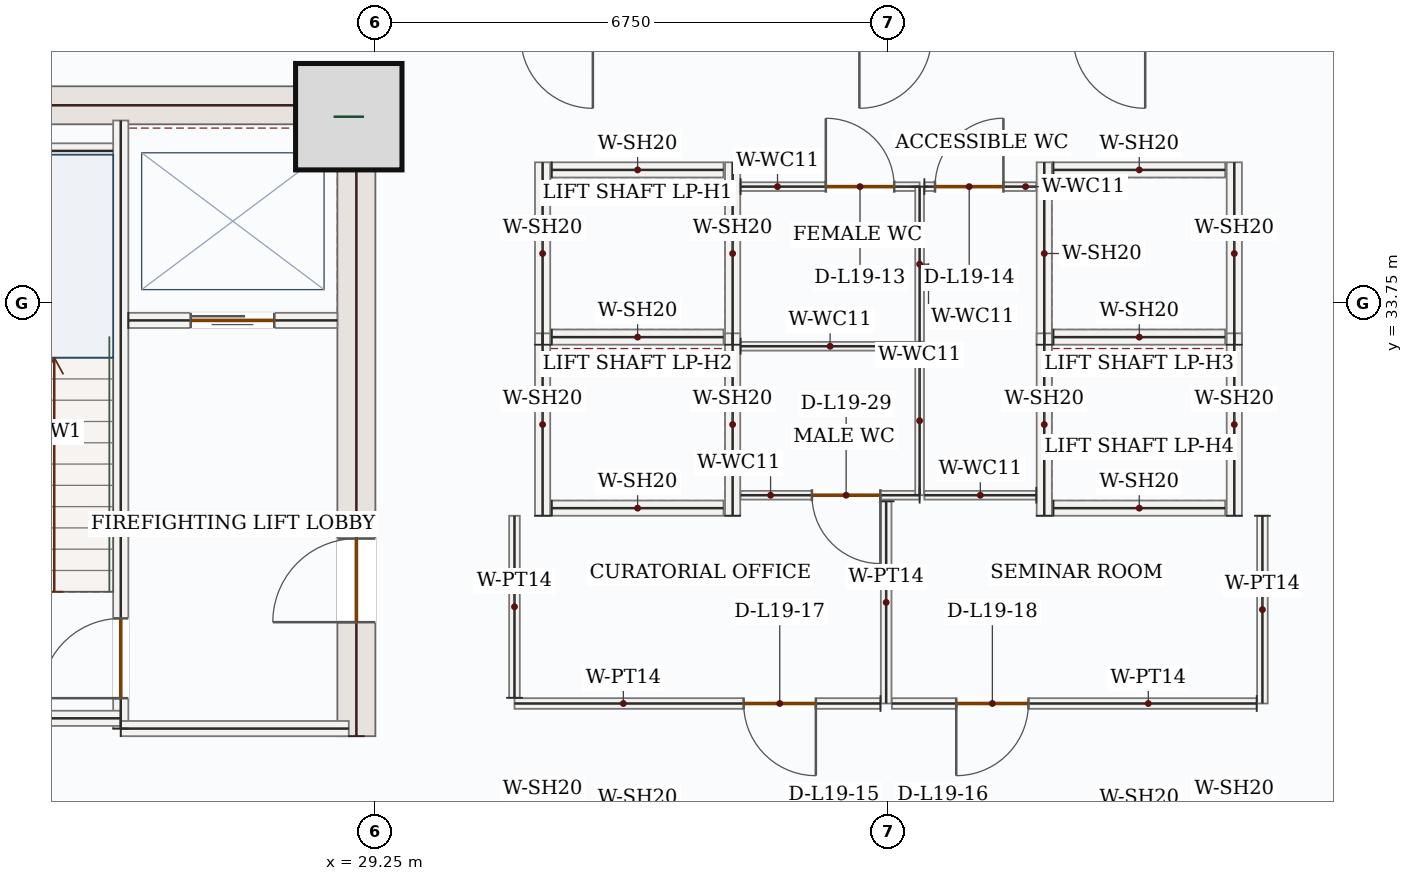
"""IFC4 building model, lengths in metres.
Left out: names, types, materials, properties, quantities, classifications, styles, units other than length and angle.
Written with IfcOpenShell. Run it as: python <this file> out.ifc"""

import sys

from ifc_helpers import new_model, si_unit, direction, frame, frame_2d, origin, origin_2d, place, context, subcontext, project, spatial, rectangle, extrude, source, transform, mapped, element, fill, save


model = new_model("IFC4")
c1 = context("Model", 3, precision=1e-05, world=origin(), true_north=direction((0.0, 1.0)))
c2 = subcontext(c1, "Body", "Model", "MODEL_VIEW")
j1 = project(units=[si_unit("LENGTHUNIT", "METRE"), si_unit("PLANEANGLEUNIT", "RADIAN")], contexts=[c1])
p1 = place(None, origin())
s1 = spatial("IfcSite", under=j1, at=p1, CompositionType="ELEMENT")
p2 = place(p1, origin())
s2 = spatial("IfcBuilding", under=s1, at=p2, CompositionType="ELEMENT")
p3 = place(p2, frame((0.0, 0.0, 87.9)))
s3 = spatial("IfcBuildingStorey", under=s2, at=p3, CompositionType="ELEMENT", Elevation=87.9)
p4 = place(p3, frame((29.0, 28.05, 0.0), z_axis=(0.0, 0.0, 1.0), x_axis=(0.0, 1.0, 0.0)))
e1 = element("IfcWall", 1, at=p4, inside=s3, PredefinedType="SHEAR", context=c2, shape_type="SweptSolid", body=[
    extrude(rectangle(XDim=8.55, YDim=0.5, at=frame_2d((4.275, 0.0))), origin(), (0.0, 0.0, 1.0), 3.95),
])
p5 = place(p4, frame((1.5, 0.0, 0.0)))
e2 = element("IfcOpeningElement", 2, at=p5, cuts=e1, PredefinedType="OPENING", context=c2, shape_type="SweptSolid", body=[
    extrude(rectangle(XDim=1.1, YDim=2.2, at=frame_2d((0.55, 1.1))), frame((0.0, 0.26, 0.0), z_axis=(0.0, -1.0, 0.0), x_axis=(1.0, 0.0, 0.0)), (0.0, 0.0, 1.0), 0.52),
])
m1 = source(origin(), c2, "Body", "SweptSolid", [
    extrude(rectangle(XDim=7.0, YDim=0.5, at=frame_2d((3.5, 0.0))), origin(), (0.0, 0.0, 1.0), 3.95),
])
p6 = place(p3, frame((21.75, 36.35, 0.0), z_axis=(0.0, 0.0, 1.0), x_axis=(1.0, 0.0, 0.0)))
e3 = element("IfcWall", 3, at=p6, inside=s3, PredefinedType="SHEAR", context=c2, shape_type="MappedRepresentation", body=[
    mapped(m1, transform((0.0, 0.0, 0.0), x_axis=(1.0, 0.0, 0.0), y_axis=(0.0, 1.0, 0.0), z_axis=(0.0, 0.0, 1.0), scale=1.0)),
])
m2 = source(origin(), c2, "Body", "SweptSolid", [
    extrude(rectangle(XDim=1.4, YDim=1.4, at=origin_2d()), origin(), (0.0, 0.0, 1.0), 4.2),
])
p7 = place(p3, frame((28.9, 36.2, 0.0), z_axis=(0.0, 0.0, 1.0), x_axis=(1.0, 0.0, 0.0)))
e4 = element("IfcColumn", 4, at=p7, inside=s3, PredefinedType="COLUMN", context=c2, shape_type="MappedRepresentation", body=[
    mapped(m2, transform((0.0, 0.0, 0.0), x_axis=(1.0, 0.0, 0.0), y_axis=(0.0, 1.0, 0.0), z_axis=(0.0, 0.0, 1.0), scale=1.0)),
])
p8 = place(p3, frame((25.9, 28.15, 0.0), z_axis=(0.0, 0.0, 1.0), x_axis=(0.0, 1.0, 0.0)))
e5 = element("IfcWall", 5, at=p8, inside=s3, PredefinedType="SOLIDWALL", context=c2, shape_type="SweptSolid", body=[
    extrude(rectangle(XDim=8.0, YDim=0.2, at=frame_2d((4.0, 0.0))), origin(), (0.0, 0.0, 1.0), 3.95),
])
p9 = place(p8, frame((0.4, 0.0, 0.0)))
e6 = element("IfcOpeningElement", 6, at=p9, cuts=e5, PredefinedType="OPENING", context=c2, shape_type="SweptSolid", body=[
    extrude(rectangle(XDim=1.05, YDim=2.15, at=frame_2d((0.525, 1.075))), frame((0.0, 0.11, 0.0), z_axis=(0.0, -1.0, 0.0), x_axis=(1.0, 0.0, 0.0)), (0.0, 0.0, 1.0), 0.22),
])
m3 = source(origin(), c2, "Body", "SweptSolid", [
    extrude(rectangle(XDim=4.25, YDim=0.2, at=frame_2d((2.125, 0.0))), origin(), (0.0, 0.0, 1.0), 3.95),
])
p10 = place(p3, frame((21.65, 28.285, 0.0), z_axis=(0.0, 0.0, 1.0), x_axis=(1.0, 0.0, 0.0)))
e7 = element("IfcWall", 7, at=p10, inside=s3, PredefinedType="SOLIDWALL", context=c2, shape_type="MappedRepresentation", body=[
    mapped(m3, transform((0.0, 0.0, 0.0), x_axis=(1.0, 0.0, 0.0), y_axis=(0.0, 1.0, 0.0), z_axis=(0.0, 0.0, 1.0), scale=1.0)),
])
m4 = source(origin(), c2, "Body", "SweptSolid", [
    extrude(rectangle(XDim=3.0, YDim=0.2, at=frame_2d((1.5, 0.0))), origin(), (0.0, 0.0, 1.0), 3.95),
])
p11 = place(p3, frame((25.9, 28.15, 0.0), z_axis=(0.0, 0.0, 1.0), x_axis=(1.0, 0.0, 0.0)))
e8 = element("IfcWall", 8, at=p11, inside=s3, PredefinedType="SOLIDWALL", context=c2, shape_type="MappedRepresentation", body=[
    mapped(m4, transform((0.0, 0.0, 0.0), x_axis=(1.0, 0.0, 0.0), y_axis=(0.0, 1.0, 0.0), z_axis=(0.0, 0.0, 1.0), scale=1.0)),
])
m5 = source(origin(), c2, "Body", "SweptSolid", [
    extrude(rectangle(XDim=3.25, YDim=0.2, at=frame_2d((1.625, 0.0))), origin(), (0.0, 0.0, 1.0), 3.95),
])
p12 = place(p3, frame((22.55, 35.75, 0.0), z_axis=(0.0, 0.0, 1.0), x_axis=(1.0, 0.0, 0.0)))
e9 = element("IfcWall", 9, at=p12, inside=s3, PredefinedType="SOLIDWALL", context=c2, shape_type="MappedRepresentation", body=[
    mapped(m5, transform((0.0, 0.0, 0.0), x_axis=(1.0, 0.0, 0.0), y_axis=(0.0, 1.0, 0.0), z_axis=(0.0, 0.0, 1.0), scale=1.0)),
])
p13 = place(p3, frame((26.0, 33.52, 0.0), z_axis=(0.0, 0.0, 1.0), x_axis=(1.0, 0.0, 0.0)))
e10 = element("IfcWall", 10, at=p13, inside=s3, PredefinedType="SOLIDWALL", context=c2, shape_type="SweptSolid", body=[
    extrude(rectangle(XDim=2.75, YDim=0.2, at=frame_2d((1.375, 0.0))), origin(), (0.0, 0.0, 1.0), 3.95),
])
p14 = place(p13, frame((0.82, 0.0, 0.0)))
e11 = element("IfcOpeningElement", 11, at=p14, cuts=e10, PredefinedType="OPENING", context=c2, shape_type="SweptSolid", body=[
    extrude(rectangle(XDim=1.1, YDim=2.15, at=frame_2d((0.55, 1.075))), frame((0.0, 0.11, 0.0), z_axis=(0.0, -1.0, 0.0), x_axis=(1.0, 0.0, 0.0)), (0.0, 0.0, 1.0), 0.22),
])
m6 = source(origin(), c2, "Body", "SweptSolid", [
    extrude(rectangle(XDim=2.4, YDim=0.2, at=frame_2d((1.2, 0.0))), origin(), (0.0, 0.0, 1.0), 3.95),
])
for number, where, z_axis, x_axis in (
    (12, (31.45, 33.2, 0.0), (0.0, 0.0, 1.0), (0.0, 1.0, 0.0)),
    (13, (33.95, 33.2, 0.0), (0.0, 0.0, 1.0), (0.0, 1.0, 0.0)),
):
    element("IfcWall", number, at=place(p3, frame(where, z_axis=z_axis, x_axis=x_axis)), inside=s3, PredefinedType="SOLIDWALL", context=c2, shape_type="MappedRepresentation", body=[
        mapped(m6, transform((0.0, 0.0, 0.0), x_axis=(1.0, 0.0, 0.0), y_axis=(0.0, 1.0, 0.0), z_axis=(0.0, 0.0, 1.0), scale=1.0)),
    ])
m7 = source(origin(), c2, "Body", "SweptSolid", [
    extrude(rectangle(XDim=2.26, YDim=0.2, at=frame_2d((1.13, 0.0))), origin(), (0.0, 0.0, 1.0), 3.95),
])
for number, where, z_axis, x_axis in (
    (14, (31.57, 33.3, 0.0), (0.0, 0.0, 1.0), (1.0, 0.0, 0.0)),
    (15, (31.57, 35.5, 0.0), (0.0, 0.0, 1.0), (1.0, 0.0, 0.0)),
):
    element("IfcWall", number, at=place(p3, frame(where, z_axis=z_axis, x_axis=x_axis)), inside=s3, PredefinedType="SOLIDWALL", context=c2, shape_type="MappedRepresentation", body=[
        mapped(m7, transform((0.0, 0.0, 0.0), x_axis=(1.0, 0.0, 0.0), y_axis=(0.0, 1.0, 0.0), z_axis=(0.0, 0.0, 1.0), scale=1.0)),
    ])
for number, where, z_axis, x_axis in (
    (16, (31.45, 30.95, 0.0), (0.0, 0.0, 1.0), (0.0, 1.0, 0.0)),
    (17, (33.95, 30.95, 0.0), (0.0, 0.0, 1.0), (0.0, 1.0, 0.0)),
):
    element("IfcWall", number, at=place(p3, frame(where, z_axis=z_axis, x_axis=x_axis)), inside=s3, PredefinedType="SOLIDWALL", context=c2, shape_type="MappedRepresentation", body=[
        mapped(m6, transform((0.0, 0.0, 0.0), x_axis=(1.0, 0.0, 0.0), y_axis=(0.0, 1.0, 0.0), z_axis=(0.0, 0.0, 1.0), scale=1.0)),
    ])
p15 = place(p3, frame((31.57, 31.05, 0.0), z_axis=(0.0, 0.0, 1.0), x_axis=(1.0, 0.0, 0.0)))
e18 = element("IfcWall", 18, at=p15, inside=s3, PredefinedType="SOLIDWALL", context=c2, shape_type="MappedRepresentation", body=[
    mapped(m7, transform((0.0, 0.0, 0.0), x_axis=(1.0, 0.0, 0.0), y_axis=(0.0, 1.0, 0.0), z_axis=(0.0, 0.0, 1.0), scale=1.0)),
])
for number, where, z_axis, x_axis in (
    (19, (38.05, 33.2, 0.0), (0.0, 0.0, 1.0), (0.0, 1.0, 0.0)),
    (20, (40.55, 33.2, 0.0), (0.0, 0.0, 1.0), (0.0, 1.0, 0.0)),
):
    element("IfcWall", number, at=place(p3, frame(where, z_axis=z_axis, x_axis=x_axis)), inside=s3, PredefinedType="SOLIDWALL", context=c2, shape_type="MappedRepresentation", body=[
        mapped(m6, transform((0.0, 0.0, 0.0), x_axis=(1.0, 0.0, 0.0), y_axis=(0.0, 1.0, 0.0), z_axis=(0.0, 0.0, 1.0), scale=1.0)),
    ])
for number, where, z_axis, x_axis in (
    (21, (38.17, 33.3, 0.0), (0.0, 0.0, 1.0), (1.0, 0.0, 0.0)),
    (22, (38.17, 35.5, 0.0), (0.0, 0.0, 1.0), (1.0, 0.0, 0.0)),
):
    element("IfcWall", number, at=place(p3, frame(where, z_axis=z_axis, x_axis=x_axis)), inside=s3, PredefinedType="SOLIDWALL", context=c2, shape_type="MappedRepresentation", body=[
        mapped(m7, transform((0.0, 0.0, 0.0), x_axis=(1.0, 0.0, 0.0), y_axis=(0.0, 1.0, 0.0), z_axis=(0.0, 0.0, 1.0), scale=1.0)),
    ])
for number, where, z_axis, x_axis in (
    (23, (38.05, 30.95, 0.0), (0.0, 0.0, 1.0), (0.0, 1.0, 0.0)),
    (24, (40.55, 30.95, 0.0), (0.0, 0.0, 1.0), (0.0, 1.0, 0.0)),
):
    element("IfcWall", number, at=place(p3, frame(where, z_axis=z_axis, x_axis=x_axis)), inside=s3, PredefinedType="SOLIDWALL", context=c2, shape_type="MappedRepresentation", body=[
        mapped(m6, transform((0.0, 0.0, 0.0), x_axis=(1.0, 0.0, 0.0), y_axis=(0.0, 1.0, 0.0), z_axis=(0.0, 0.0, 1.0), scale=1.0)),
    ])
p16 = place(p3, frame((38.17, 31.05, 0.0), z_axis=(0.0, 0.0, 1.0), x_axis=(1.0, 0.0, 0.0)))
e25 = element("IfcWall", 25, at=p16, inside=s3, PredefinedType="SOLIDWALL", context=c2, shape_type="MappedRepresentation", body=[
    mapped(m7, transform((0.0, 0.0, 0.0), x_axis=(1.0, 0.0, 0.0), y_axis=(0.0, 1.0, 0.0), z_axis=(0.0, 0.0, 1.0), scale=1.0)),
])
p17 = place(p3, frame((36.41, 31.22, 0.0), z_axis=(0.0, 0.0, 1.0), x_axis=(-1.0, 0.0, 0.0)))
e26 = element("IfcWall", 26, at=p17, inside=s3, PredefinedType="PARTITIONING", context=c2, shape_type="SweptSolid", body=[
    extrude(rectangle(XDim=2.355, YDim=0.115, at=frame_2d((1.177, 0.0))), origin(), (0.0, 0.0, 1.0), 3.95),
])
p18 = place(p17, frame((0.517, 0.0, 0.0)))
e27 = element("IfcOpeningElement", 27, at=p18, cuts=e26, PredefinedType="OPENING", context=c2, shape_type="SweptSolid", body=[
    extrude(rectangle(XDim=0.9, YDim=2.1, at=frame_2d((0.45, 1.05))), frame((0.0, 0.067, 0.0), z_axis=(0.0, -1.0, 0.0), x_axis=(1.0, 0.0, 0.0)), (0.0, 0.0, 1.0), 0.135),
])
m8 = source(origin(), c2, "Body", "SweptSolid", [
    extrude(rectangle(XDim=2.355, YDim=0.115, at=frame_2d((1.177, 0.0))), origin(), (0.0, 0.0, 1.0), 3.95),
])
p19 = place(p3, frame((34.055, 33.18, 0.0), z_axis=(0.0, 0.0, 1.0), x_axis=(1.0, 0.0, 0.0)))
e28 = element("IfcWall", 28, at=p19, inside=s3, PredefinedType="PARTITIONING", context=c2, shape_type="MappedRepresentation", body=[
    mapped(m8, transform((0.0, 0.0, 0.0), x_axis=(1.0, 0.0, 0.0), y_axis=(0.0, 1.0, 0.0), z_axis=(0.0, 0.0, 1.0), scale=1.0)),
])
m9 = source(origin(), c2, "Body", "SweptSolid", [
    extrude(rectangle(XDim=1.96, YDim=0.115, at=frame_2d((0.98, 0.0))), origin(), (0.0, 0.0, 1.0), 3.95),
])
p20 = place(p3, frame((36.41, 33.18, 0.0), z_axis=(0.0, 0.0, 1.0), x_axis=(0.0, -1.0, 0.0)))
e29 = element("IfcWall", 29, at=p20, inside=s3, PredefinedType="PARTITIONING", context=c2, shape_type="MappedRepresentation", body=[
    mapped(m9, transform((0.0, 0.0, 0.0), x_axis=(1.0, 0.0, 0.0), y_axis=(0.0, 1.0, 0.0), z_axis=(0.0, 0.0, 1.0), scale=1.0)),
])
p21 = place(p3, frame((34.055, 35.28, 0.0), z_axis=(0.0, 0.0, 1.0), x_axis=(1.0, 0.0, 0.0)))
e30 = element("IfcWall", 30, at=p21, inside=s3, PredefinedType="PARTITIONING", context=c2, shape_type="SweptSolid", body=[
    extrude(rectangle(XDim=2.355, YDim=0.115, at=frame_2d((1.177, 0.0))), origin(), (0.0, 0.0, 1.0), 3.95),
])
p22 = place(p21, frame((1.121, 0.0, 0.0)))
e31 = element("IfcOpeningElement", 31, at=p22, cuts=e30, PredefinedType="OPENING", context=c2, shape_type="SweptSolid", body=[
    extrude(rectangle(XDim=0.9, YDim=2.1, at=frame_2d((0.45, 1.05))), frame((0.0, 0.067, 0.0), z_axis=(0.0, -1.0, 0.0), x_axis=(1.0, 0.0, 0.0)), (0.0, 0.0, 1.0), 0.135),
])
m10 = source(origin(), c2, "Body", "SweptSolid", [
    extrude(rectangle(XDim=2.04, YDim=0.115, at=frame_2d((1.02, 0.0))), origin(), (0.0, 0.0, 1.0), 3.95),
])
p23 = place(p3, frame((36.41, 35.28, 0.0), z_axis=(0.0, 0.0, 1.0), x_axis=(0.0, -1.0, 0.0)))
e32 = element("IfcWall", 32, at=p23, inside=s3, PredefinedType="PARTITIONING", context=c2, shape_type="MappedRepresentation", body=[
    mapped(m10, transform((0.0, 0.0, 0.0), x_axis=(1.0, 0.0, 0.0), y_axis=(0.0, 1.0, 0.0), z_axis=(0.0, 0.0, 1.0), scale=1.0)),
])
m11 = source(origin(), c2, "Body", "SweptSolid", [
    extrude(rectangle(XDim=1.473, YDim=0.115, at=frame_2d((0.736, 0.0))), origin(), (0.0, 0.0, 1.0), 3.95),
])
p24 = place(p3, frame((37.945, 31.22, 0.0), z_axis=(0.0, 0.0, 1.0), x_axis=(-1.0, 0.0, 0.0)))
e33 = element("IfcWall", 33, at=p24, inside=s3, PredefinedType="PARTITIONING", context=c2, shape_type="MappedRepresentation", body=[
    mapped(m11, transform((0.0, 0.0, 0.0), x_axis=(1.0, 0.0, 0.0), y_axis=(0.0, 1.0, 0.0), z_axis=(0.0, 0.0, 1.0), scale=1.0)),
])
p25 = place(p3, frame((36.472, 35.28, 0.0), z_axis=(0.0, 0.0, 1.0), x_axis=(1.0, 0.0, 0.0)))
e34 = element("IfcWall", 34, at=p25, inside=s3, PredefinedType="PARTITIONING", context=c2, shape_type="SweptSolid", body=[
    extrude(rectangle(XDim=1.473, YDim=0.115, at=frame_2d((0.736, 0.0))), origin(), (0.0, 0.0, 1.0), 3.95),
])
p26 = place(p25, frame((0.14, 0.0, 0.0)))
e35 = element("IfcOpeningElement", 35, at=p26, cuts=e34, PredefinedType="OPENING", context=c2, shape_type="SweptSolid", body=[
    extrude(rectangle(XDim=0.9, YDim=2.1, at=frame_2d((0.45, 1.05))), frame((0.0, 0.067, 0.0), z_axis=(0.0, -1.0, 0.0), x_axis=(1.0, 0.0, 0.0)), (0.0, 0.0, 1.0), 0.135),
])
m12 = source(origin(), c2, "Body", "SweptSolid", [
    extrude(rectangle(XDim=2.66, YDim=0.14, at=frame_2d((1.33, 0.0))), origin(), (0.0, 0.0, 1.0), 3.95),
])
p27 = place(p3, frame((35.97, 31.14, 0.0), z_axis=(0.0, 0.0, 1.0), x_axis=(0.0, -1.0, 0.0)))
e36 = element("IfcWall", 36, at=p27, inside=s3, PredefinedType="PARTITIONING", context=c2, shape_type="MappedRepresentation", body=[
    mapped(m12, transform((0.0, 0.0, 0.0), x_axis=(1.0, 0.0, 0.0), y_axis=(0.0, 1.0, 0.0), z_axis=(0.0, 0.0, 1.0), scale=1.0)),
])
p28 = place(p3, frame((35.895, 28.48, 0.0), z_axis=(0.0, 0.0, 1.0), x_axis=(-1.0, 0.0, 0.0)))
e37 = element("IfcWall", 37, at=p28, inside=s3, PredefinedType="PARTITIONING", context=c2, shape_type="SweptSolid", body=[
    extrude(rectangle(XDim=4.815, YDim=0.14, at=frame_2d((2.407, 0.0))), origin(), (0.0, 0.0, 1.0), 3.95),
])
p29 = place(p28, frame((0.85, 0.0, 0.0)))
e38 = element("IfcOpeningElement", 38, at=p29, cuts=e37, PredefinedType="OPENING", context=c2, shape_type="SweptSolid", body=[
    extrude(rectangle(XDim=0.95, YDim=2.15, at=frame_2d((0.475, 1.075))), frame((0.0, 0.08, 0.0), z_axis=(0.0, -1.0, 0.0), x_axis=(1.0, 0.0, 0.0)), (0.0, 0.0, 1.0), 0.16),
])
m13 = source(origin(), c2, "Body", "SweptSolid", [
    extrude(rectangle(XDim=2.395, YDim=0.14, at=frame_2d((1.198, 0.0))), origin(), (0.0, 0.0, 1.0), 3.95),
])
p30 = place(p3, frame((31.08, 28.555, 0.0), z_axis=(0.0, 0.0, 1.0), x_axis=(0.0, 1.0, 0.0)))
e39 = element("IfcWall", 39, at=p30, inside=s3, PredefinedType="PARTITIONING", context=c2, shape_type="MappedRepresentation", body=[
    mapped(m13, transform((0.0, 0.0, 0.0), x_axis=(1.0, 0.0, 0.0), y_axis=(0.0, 1.0, 0.0), z_axis=(0.0, 0.0, 1.0), scale=1.0)),
])
m14 = source(origin(), c2, "Body", "SweptSolid", [
    extrude(rectangle(XDim=2.47, YDim=0.14, at=frame_2d((1.235, 0.0))), origin(), (0.0, 0.0, 1.0), 3.95),
])
p31 = place(p3, frame((40.92, 30.95, 0.0), z_axis=(0.0, 0.0, 1.0), x_axis=(0.0, -1.0, 0.0)))
e40 = element("IfcWall", 40, at=p31, inside=s3, PredefinedType="PARTITIONING", context=c2, shape_type="MappedRepresentation", body=[
    mapped(m14, transform((0.0, 0.0, 0.0), x_axis=(1.0, 0.0, 0.0), y_axis=(0.0, 1.0, 0.0), z_axis=(0.0, 0.0, 1.0), scale=1.0)),
])
p32 = place(p3, frame((40.845, 28.48, 0.0), z_axis=(0.0, 0.0, 1.0), x_axis=(-1.0, 0.0, 0.0)))
e41 = element("IfcWall", 41, at=p32, inside=s3, PredefinedType="PARTITIONING", context=c2, shape_type="SweptSolid", body=[
    extrude(rectangle(XDim=4.8, YDim=0.14, at=frame_2d((2.4, 0.0))), origin(), (0.0, 0.0, 1.0), 3.95),
])
p33 = place(p32, frame((3.003, 0.0, 0.0)))
e42 = element("IfcOpeningElement", 42, at=p33, cuts=e41, PredefinedType="OPENING", context=c2, shape_type="SweptSolid", body=[
    extrude(rectangle(XDim=0.95, YDim=2.15, at=frame_2d((0.475, 1.075))), frame((0.0, 0.08, 0.0), z_axis=(0.0, -1.0, 0.0), x_axis=(1.0, 0.0, 0.0)), (0.0, 0.0, 1.0), 0.16),
])
m15 = source(origin(), c2, "Body", "SweptSolid", [
    extrude(rectangle(XDim=1.05, YDim=2.15, at=frame_2d((0.525, 1.075))), frame((0.0, 0.025, 0.0), z_axis=(0.0, -1.0, 0.0), x_axis=(1.0, 0.0, 0.0)), (0.0, 0.0, 1.0), 0.05),
])
p34 = place(p9, origin())
e43 = element("IfcDoor", 43, at=p34, inside=s3, OperationType="SINGLE_SWING_LEFT", PredefinedType="DOOR", context=c2, shape_type="MappedRepresentation", body=[
    mapped(m15, transform((0.0, 0.0, 0.0), x_axis=(1.0, 0.0, 0.0), y_axis=(0.0, 1.0, 0.0), z_axis=(0.0, 0.0, 1.0), scale=1.0)),
])
fill(e6, e43)
m16 = source(origin(), c2, "Body", "SweptSolid", [
    extrude(rectangle(XDim=1.1, YDim=2.15, at=frame_2d((0.55, 1.075))), frame((0.0, 0.025, 0.0), z_axis=(0.0, -1.0, 0.0), x_axis=(1.0, 0.0, 0.0)), (0.0, 0.0, 1.0), 0.05),
])
p35 = place(p14, origin())
e44 = element("IfcDoor", 44, at=p35, inside=s3, OperationType="DOUBLE_DOOR_SLIDING", PredefinedType="DOOR", context=c2, shape_type="MappedRepresentation", body=[
    mapped(m16, transform((0.0, 0.0, 0.0), x_axis=(1.0, 0.0, 0.0), y_axis=(0.0, 1.0, 0.0), z_axis=(0.0, 0.0, 1.0), scale=1.0)),
])
fill(e11, e44)
m17 = source(origin(), c2, "Body", "SweptSolid", [
    extrude(rectangle(XDim=1.1, YDim=2.2, at=frame_2d((0.55, 1.1))), frame((0.0, 0.025, 0.0), z_axis=(0.0, -1.0, 0.0), x_axis=(1.0, 0.0, 0.0)), (0.0, 0.0, 1.0), 0.05),
])
p36 = place(p5, origin())
e45 = element("IfcDoor", 45, at=p36, inside=s3, OperationType="SINGLE_SWING_LEFT", PredefinedType="DOOR", context=c2, shape_type="MappedRepresentation", body=[
    mapped(m17, transform((0.0, 0.0, 0.0), x_axis=(1.0, 0.0, 0.0), y_axis=(0.0, 1.0, 0.0), z_axis=(0.0, 0.0, 1.0), scale=1.0)),
])
fill(e2, e45)
m18 = source(origin(), c2, "Body", "SweptSolid", [
    extrude(rectangle(XDim=0.9, YDim=2.1, at=frame_2d((0.45, 1.05))), frame((0.0, 0.025, 0.0), z_axis=(0.0, -1.0, 0.0), x_axis=(1.0, 0.0, 0.0)), (0.0, 0.0, 1.0), 0.05),
])
p37 = place(p22, origin())
e46 = element("IfcDoor", 46, at=p37, inside=s3, OperationType="SINGLE_SWING_LEFT", PredefinedType="DOOR", context=c2, shape_type="MappedRepresentation", body=[
    mapped(m18, transform((0.0, 0.0, 0.0), x_axis=(1.0, 0.0, 0.0), y_axis=(0.0, 1.0, 0.0), z_axis=(0.0, 0.0, 1.0), scale=1.0)),
])
fill(e31, e46)
p38 = place(p26, origin())
e47 = element("IfcDoor", 47, at=p38, inside=s3, OperationType="SINGLE_SWING_RIGHT", PredefinedType="DOOR", context=c2, shape_type="MappedRepresentation", body=[
    mapped(m18, transform((0.0, 0.0, 0.0), x_axis=(1.0, 0.0, 0.0), y_axis=(0.0, 1.0, 0.0), z_axis=(0.0, 0.0, 1.0), scale=1.0)),
])
fill(e35, e47)
m19 = source(origin(), c2, "Body", "SweptSolid", [
    extrude(rectangle(XDim=0.95, YDim=2.15, at=frame_2d((0.475, 1.075))), frame((0.0, 0.025, 0.0), z_axis=(0.0, -1.0, 0.0), x_axis=(1.0, 0.0, 0.0)), (0.0, 0.0, 1.0), 0.05),
])
p39 = place(p29, origin())
e48 = element("IfcDoor", 48, at=p39, inside=s3, OperationType="SINGLE_SWING_LEFT", PredefinedType="DOOR", context=c2, shape_type="MappedRepresentation", body=[
    mapped(m19, transform((0.0, 0.0, 0.0), x_axis=(1.0, 0.0, 0.0), y_axis=(0.0, 1.0, 0.0), z_axis=(0.0, 0.0, 1.0), scale=1.0)),
])
fill(e38, e48)
p40 = place(p33, origin())
e49 = element("IfcDoor", 49, at=p40, inside=s3, OperationType="SINGLE_SWING_RIGHT", PredefinedType="DOOR", context=c2, shape_type="MappedRepresentation", body=[
    mapped(m19, transform((0.0, 0.0, 0.0), x_axis=(1.0, 0.0, 0.0), y_axis=(0.0, 1.0, 0.0), z_axis=(0.0, 0.0, 1.0), scale=1.0)),
])
fill(e42, e49)
p41 = place(p18, origin())
e50 = element("IfcDoor", 50, at=p41, inside=s3, OperationType="SINGLE_SWING_LEFT", PredefinedType="DOOR", context=c2, shape_type="MappedRepresentation", body=[
    mapped(m18, transform((0.0, 0.0, 0.0), x_axis=(1.0, 0.0, 0.0), y_axis=(0.0, 1.0, 0.0), z_axis=(0.0, 0.0, 1.0), scale=1.0)),
])
fill(e27, e50)
save(model, sys.argv[1])
